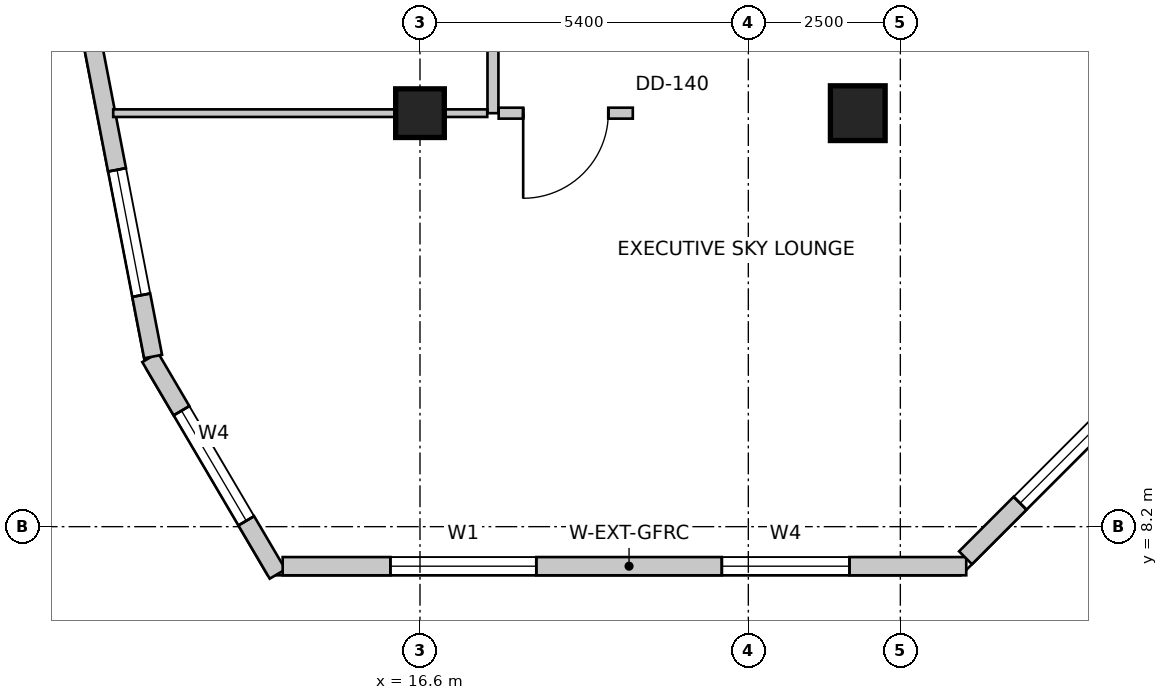
"""IFC4 building model, lengths in metres.
Left out: names, types, materials, properties, quantities, classifications, styles, units other than length and angle.
Written with IfcOpenShell. Run it as: python <this file> out.ifc"""

import sys

from ifc_helpers import new_model, si_unit, direction, frame, frame_2d, origin, origin_2d, place, context, subcontext, project, spatial, rectangle, extrude, source, transform, mapped, element, fill, save


model = new_model("IFC4")
c1 = context("Model", 3, precision=1e-05, world=origin(), true_north=direction((0.0, 1.0)))
c2 = subcontext(c1, "Body", "Model", "MODEL_VIEW")
j1 = project(units=[si_unit("LENGTHUNIT", "METRE"), si_unit("PLANEANGLEUNIT", "RADIAN")], contexts=[c1])
p1 = place(None, origin())
s1 = spatial("IfcSite", under=j1, at=p1, CompositionType="ELEMENT")
p2 = place(p1, origin())
s2 = spatial("IfcBuilding", under=s1, at=p2, CompositionType="ELEMENT")
p3 = place(p2, frame((0.0, 0.0, 132.2)))
s3 = spatial("IfcBuildingStorey", under=s2, at=p3, CompositionType="ELEMENT", Elevation=132.2)
m1 = source(origin(), c2, "Body", "SweptSolid", [
    extrude(rectangle(XDim=0.9, YDim=0.9, at=origin_2d()), origin(), (0.0, 0.0, 1.0), 3.6),
])
p4 = place(p3, frame((23.8, 15.0, 0.0), z_axis=(0.0, 0.0, 1.0), x_axis=(1.0, 0.0, 0.0)))
e1 = element("IfcColumn", 1, at=p4, inside=s3, PredefinedType="COLUMN", context=c2, shape_type="MappedRepresentation", body=[
    mapped(m1, transform((0.0, 0.0, 0.0), scale=1.0)),
])
m2 = source(origin(), c2, "Body", "SweptSolid", [
    extrude(rectangle(XDim=0.8, YDim=0.8, at=origin_2d()), origin(), (0.0, 0.0, 1.0), 3.6),
])
p5 = place(p3, frame((16.6, 15.0, 0.0), z_axis=(0.0, 0.0, 1.0), x_axis=(1.0, 0.0, 0.0)))
e2 = element("IfcColumn", 2, at=p5, inside=s3, PredefinedType="COLUMN", context=c2, shape_type="MappedRepresentation", body=[
    mapped(m2, transform((0.0, 0.0, 0.0), scale=1.0)),
])
p6 = place(p3, frame((12.162, 10.983, 0.0), z_axis=(0.0, 0.0, 1.0), x_axis=(0.506996893234, -0.861947881401, 0.0)))
e3 = element("IfcWall", 3, at=p6, inside=s3, PredefinedType="SOLIDWALL", context=c2, shape_type="SweptSolid", body=[
    extrude(rectangle(XDim=4.133, YDim=0.3, at=frame_2d((2.066, 0.0))), origin(), (0.0, 0.0, 1.0), 3.35),
])
m3 = source(origin(), c2, "Body", "SweptSolid", [
    extrude(rectangle(XDim=2.1, YDim=2.0, at=frame_2d((1.05, 1.0))), frame((0.0, 0.16, 0.0), z_axis=(0.0, -1.0, 0.0), x_axis=(1.0, 0.0, 0.0)), (0.0, 0.0, 1.0), 0.32),
])
p7 = place(p6, frame((1.017, 0.0, 0.85)))
e4 = element("IfcOpeningElement", 4, at=p7, cuts=e3, PredefinedType="OPENING", context=c2, shape_type="MappedRepresentation", body=[
    mapped(m3, transform((0.0, 0.0, 0.0), scale=1.0)),
])
p8 = place(p3, frame((14.342, 7.55, 0.0), z_axis=(0.0, 0.0, 1.0), x_axis=(1.0, 0.0, 0.0)))
e5 = element("IfcWall", 5, at=p8, inside=s3, PredefinedType="SOLIDWALL", context=c2, shape_type="SweptSolid", body=[
    extrude(rectangle(XDim=11.242, YDim=0.3, at=frame_2d((5.621, 0.0))), origin(), (0.0, 0.0, 1.0), 3.35),
])
m4 = source(origin(), c2, "Body", "SweptSolid", [
    extrude(rectangle(XDim=2.4, YDim=2.2, at=frame_2d((1.2, 1.1))), frame((0.0, 0.16, 0.0), z_axis=(0.0, -1.0, 0.0), x_axis=(1.0, 0.0, 0.0)), (0.0, 0.0, 1.0), 0.32),
])
p9 = place(p8, frame((1.771, 0.0, 0.85)))
e6 = element("IfcOpeningElement", 6, at=p9, cuts=e5, PredefinedType="OPENING", context=c2, shape_type="MappedRepresentation", body=[
    mapped(m4, transform((0.0, 0.0, 0.0), scale=1.0)),
])
p10 = place(p8, frame((7.222, 0.0, 0.85)))
e7 = element("IfcOpeningElement", 7, at=p10, cuts=e5, PredefinedType="OPENING", context=c2, shape_type="MappedRepresentation", body=[
    mapped(m3, transform((0.0, 0.0, 0.0), scale=1.0)),
])
p11 = place(p3, frame((25.572, 7.688, 0.0), z_axis=(0.0, 0.0, 1.0), x_axis=(0.70708046583, 0.707133095564, 0.0)))
e8 = element("IfcWall", 8, at=p11, inside=s3, PredefinedType="SOLIDWALL", context=c2, shape_type="SweptSolid", body=[
    extrude(rectangle(XDim=4.639, YDim=0.3, at=frame_2d((2.319, 0.0))), origin(), (0.0, 0.0, 1.0), 3.35),
])
p12 = place(p11, frame((1.269, 0.0, 0.85)))
e9 = element("IfcOpeningElement", 9, at=p12, cuts=e8, PredefinedType="OPENING", context=c2, shape_type="MappedRepresentation", body=[
    mapped(m3, transform((0.0, 0.0, 0.0), scale=1.0)),
])
p13 = place(p3, frame((8.185, 31.834, 0.0), z_axis=(0.0, 0.0, 1.0), x_axis=(0.189707113148, -0.981840725994, 0.0)))
e10 = element("IfcWall", 10, at=p13, inside=s3, PredefinedType="SOLIDWALL", context=c2, shape_type="SweptSolid", body=[
    extrude(rectangle(XDim=21.221, YDim=0.3, at=frame_2d((10.611, 0.0))), origin(), (0.0, 0.0, 1.0), 3.35),
])
m5 = source(origin(), c2, "Body", "SweptSolid", [
    extrude(rectangle(XDim=1.2, YDim=1.6, at=frame_2d((0.6, 0.8))), frame((0.0, 0.16, 0.0), z_axis=(0.0, -1.0, 0.0), x_axis=(1.0, 0.0, 0.0)), (0.0, 0.0, 1.0), 0.32),
])
p14 = place(p13, frame((1.127, 0.0, 0.85)))
e11 = element("IfcOpeningElement", 11, at=p14, cuts=e10, PredefinedType="OPENING", context=c2, shape_type="MappedRepresentation", body=[
    mapped(m5, transform((0.0, 0.0, 0.0), scale=1.0)),
])
p15 = place(p13, frame((4.369, 0.0, 0.85)))
e12 = element("IfcOpeningElement", 12, at=p15, cuts=e10, PredefinedType="OPENING", context=c2, shape_type="MappedRepresentation", body=[
    mapped(m3, transform((0.0, 0.0, 0.0), scale=1.0)),
])
p16 = place(p13, frame((8.521, 0.0, 0.85)))
e13 = element("IfcOpeningElement", 13, at=p16, cuts=e10, PredefinedType="OPENING", context=c2, shape_type="MappedRepresentation", body=[
    mapped(m5, transform((0.0, 0.0, 0.0), scale=1.0)),
])
p17 = place(p13, frame((12.654, 0.0, 0.85)))
e14 = element("IfcOpeningElement", 14, at=p17, cuts=e10, PredefinedType="OPENING", context=c2, shape_type="MappedRepresentation", body=[
    mapped(m3, transform((0.0, 0.0, 0.0), scale=1.0)),
])
p18 = place(p13, frame((18.094, 0.0, 0.85)))
e15 = element("IfcOpeningElement", 15, at=p18, cuts=e10, PredefinedType="OPENING", context=c2, shape_type="MappedRepresentation", body=[
    mapped(m3, transform((0.0, 0.0, 0.0), scale=1.0)),
])
p19 = place(p3, frame((17.8, 15.0, 0.0), z_axis=(0.0, 0.0, 1.0), x_axis=(0.0, 1.0, 0.0)))
e16 = element("IfcWall", 16, at=p19, inside=s3, PredefinedType="PARTITIONING", context=c2, shape_type="SweptSolid", body=[
    extrude(rectangle(XDim=8.838, YDim=0.18, at=frame_2d((4.419, 0.0))), origin(), (0.0, 0.0, 1.0), 2.492),
])
m6 = source(origin(), c2, "Body", "SweptSolid", [
    extrude(rectangle(XDim=0.9, YDim=2.15, at=frame_2d((0.45, 1.075))), frame((0.0, 0.1, 0.0), z_axis=(0.0, -1.0, 0.0), x_axis=(1.0, 0.0, 0.0)), (0.0, 0.0, 1.0), 0.2),
])
p20 = place(p19, frame((3.908, 0.0, 0.0)))
e17 = element("IfcOpeningElement", 17, at=p20, cuts=e16, PredefinedType="OPENING", context=c2, shape_type="MappedRepresentation", body=[
    mapped(m6, transform((0.0, 0.0, 0.0), scale=1.0)),
])
p21 = place(p3, frame((20.1, 15.0, 0.0), z_axis=(0.0, 0.0, 1.0), x_axis=(-1.0, 0.0, 0.0)))
e18 = element("IfcWall", 18, at=p21, inside=s3, PredefinedType="PARTITIONING", context=c2, shape_type="SweptSolid", body=[
    extrude(rectangle(XDim=2.206, YDim=0.18, at=frame_2d((1.103, 0.0))), origin(), (0.0, 0.0, 1.0), 2.492),
])
m7 = source(origin(), c2, "Body", "SweptSolid", [
    extrude(rectangle(XDim=1.4, YDim=2.15, at=frame_2d((0.7, 1.075))), frame((0.0, 0.1, 0.0), z_axis=(0.0, -1.0, 0.0), x_axis=(1.0, 0.0, 0.0)), (0.0, 0.0, 1.0), 0.2),
])
p22 = place(p21, frame((0.403, 0.0, 0.0)))
e19 = element("IfcOpeningElement", 19, at=p22, cuts=e18, PredefinedType="OPENING", context=c2, shape_type="MappedRepresentation", body=[
    mapped(m7, transform((0.0, 0.0, 0.0), scale=1.0)),
])
p23 = place(p3, frame((17.706, 15.0, 0.0), z_axis=(0.0, 0.0, 1.0), x_axis=(-1.0, 0.0, 0.0)))
e20 = element("IfcWall", 20, at=p23, inside=s3, PredefinedType="PARTITIONING", context=c2, shape_type="SweptSolid", body=[
    extrude(rectangle(XDim=6.152, YDim=0.125, at=frame_2d((3.076, 0.0))), origin(), (0.0, 0.0, 1.0), 2.492),
])
m8 = source(origin(), c2, "Body", "SweptSolid", [
    extrude(rectangle(XDim=2.1, YDim=2.0, at=frame_2d((1.05, 1.0))), frame((0.0, -0.015, 0.0), z_axis=(0.0, -1.0, 0.0), x_axis=(1.0, 0.0, 0.0)), (0.0, 0.0, 1.0), 0.06),
])
p24 = place(p7, origin())
e21 = element("IfcWindow", 21, at=p24, inside=s3, PartitioningType="SINGLE_PANEL", PredefinedType="WINDOW", context=c2, shape_type="MappedRepresentation", body=[
    mapped(m8, transform((0.0, 0.0, 0.0), scale=1.0)),
])
fill(e4, e21)
m9 = source(origin(), c2, "Body", "SweptSolid", [
    extrude(rectangle(XDim=2.4, YDim=2.2, at=frame_2d((1.2, 1.1))), frame((0.0, -0.015, 0.0), z_axis=(0.0, -1.0, 0.0), x_axis=(1.0, 0.0, 0.0)), (0.0, 0.0, 1.0), 0.06),
])
p25 = place(p9, origin())
e22 = element("IfcWindow", 22, at=p25, inside=s3, PartitioningType="SINGLE_PANEL", PredefinedType="WINDOW", context=c2, shape_type="MappedRepresentation", body=[
    mapped(m9, transform((0.0, 0.0, 0.0), scale=1.0)),
])
fill(e6, e22)
p26 = place(p10, origin())
e23 = element("IfcWindow", 23, at=p26, inside=s3, PartitioningType="SINGLE_PANEL", PredefinedType="WINDOW", context=c2, shape_type="MappedRepresentation", body=[
    mapped(m8, transform((0.0, 0.0, 0.0), scale=1.0)),
])
fill(e7, e23)
p27 = place(p12, origin())
e24 = element("IfcWindow", 24, at=p27, inside=s3, PartitioningType="SINGLE_PANEL", PredefinedType="WINDOW", context=c2, shape_type="MappedRepresentation", body=[
    mapped(m8, transform((0.0, 0.0, 0.0), scale=1.0)),
])
fill(e9, e24)
p28 = place(p18, origin())
e25 = element("IfcWindow", 25, at=p28, inside=s3, PartitioningType="SINGLE_PANEL", PredefinedType="WINDOW", context=c2, shape_type="MappedRepresentation", body=[
    mapped(m8, transform((0.0, 0.0, 0.0), scale=1.0)),
])
fill(e15, e25)
m10 = source(origin(), c2, "Body", "SweptSolid", [
    extrude(rectangle(XDim=1.4, YDim=2.15, at=frame_2d((0.7, 1.075))), frame((0.0, 0.025, 0.0), z_axis=(0.0, -1.0, 0.0), x_axis=(1.0, 0.0, 0.0)), (0.0, 0.0, 1.0), 0.05),
])
p29 = place(p22, origin())
e26 = element("IfcDoor", 26, at=p29, inside=s3, OperationType="SINGLE_SWING_RIGHT", PredefinedType="DOOR", context=c2, shape_type="MappedRepresentation", body=[
    mapped(m10, transform((0.0, 0.0, 0.0), scale=1.0)),
])
fill(e19, e26)
save(model, sys.argv[1])
